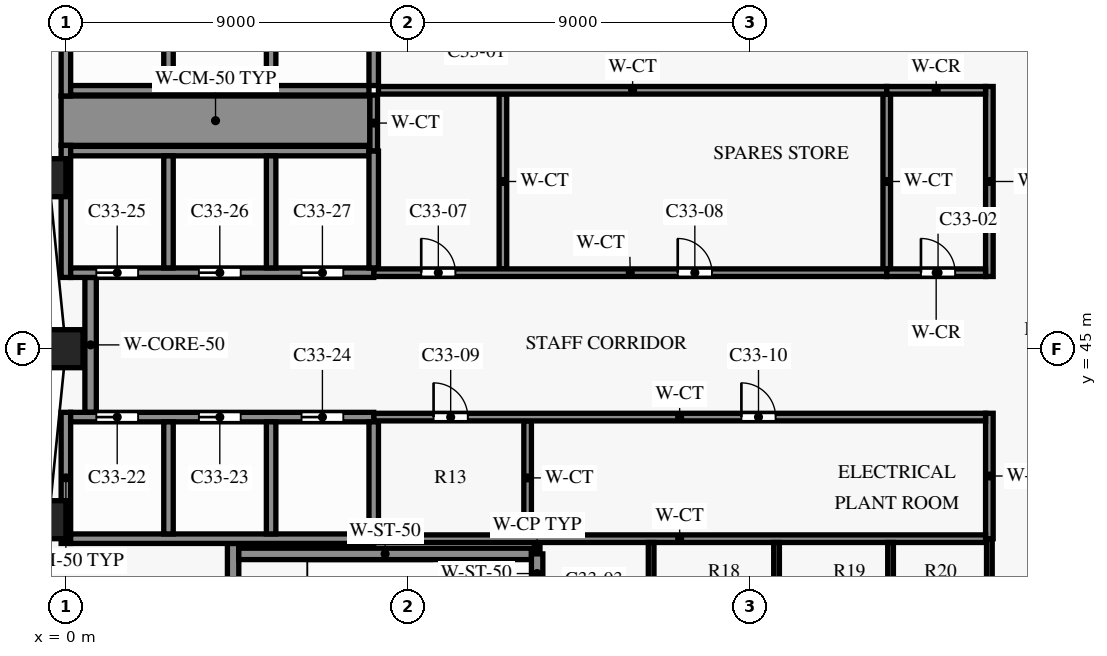
"""IFC4 building model, lengths in metres.
Left out: names, types, materials, properties, quantities, classifications, styles, units other than length and angle.
Written with IfcOpenShell. Run it as: python <this file> out.ifc"""

import sys

from ifc_helpers import new_model, si_unit, direction, frame, frame_2d, origin, origin_2d, place, context, subcontext, project, spatial, rectangle, extrude, element, fill, save


model = new_model("IFC4")
c1 = context("Model", 3, precision=1e-05, world=origin(), true_north=direction((0.0, 1.0)))
c2 = subcontext(c1, "Body", "Model", "MODEL_VIEW")
j1 = project(units=[si_unit("LENGTHUNIT", "METRE"), si_unit("PLANEANGLEUNIT", "RADIAN")], contexts=[c1])
p1 = place(None, origin())
s1 = spatial("IfcSite", under=j1, at=p1, CompositionType="ELEMENT")
p2 = place(p1, origin())
s2 = spatial("IfcBuilding", under=s1, at=p2, CompositionType="ELEMENT")
p3 = place(p2, frame((0.0, 0.0, 248.2)))
s3 = spatial("IfcBuildingStorey", under=s2, at=p3, CompositionType="ELEMENT", Elevation=248.2)
for number, where, z_axis, x_axis in (
    (1, (-0.45, 49.5, 0.0), (0.0, 0.0, 1.0), (0.1, -0.995, 0.0)),
    (2, (0.0, 45.0, 0.0), (0.0, 0.0, 1.0), (0.0, -1.0, 0.0)),
    (3, (-0.45, 40.5, 0.0), (0.0, 0.0, 1.0), (-0.1, -0.995, 0.0)),
):
    element("IfcColumn", number, at=place(p3, frame(where, z_axis=z_axis, x_axis=x_axis)), inside=s3, PredefinedType="COLUMN", context=c2, shape_type="SweptSolid", body=[
        extrude(rectangle(XDim=0.9, YDim=1.0, at=origin_2d()), origin(), (0.0, 0.0, 1.0), 4.2),
    ])
p4 = place(p3, frame((4.55, 39.6, 0.0), z_axis=(0.0, 0.0, 1.0), x_axis=(1.0, 0.0, 0.0)))
e4 = element("IfcWall", 4, at=p4, inside=s3, PredefinedType="SHEAR", context=c2, shape_type="SweptSolid", body=[
    extrude(rectangle(XDim=7.7, YDim=0.3, at=frame_2d((3.85, 0.0))), origin(), (0.0, 0.0, 1.0), 3.9),
])
p5 = place(p3, frame((8.1, 40.0, 0.0), z_axis=(0.0, 0.0, 1.0), x_axis=(1.0, 0.0, 0.0)))
e5 = element("IfcWall", 5, at=p5, inside=s3, PredefinedType="PARTITIONING", context=c2, shape_type="SweptSolid", body=[
    extrude(rectangle(XDim=16.1, YDim=0.2, at=frame_2d((8.05, 0.0))), origin(), (0.0, 0.0, 1.0), 3.9),
])
p6 = place(p3, frame((0.125, 40.0, 0.0), z_axis=(0.0, 0.0, 1.0), x_axis=(1.0, 0.0, 0.0)))
e6 = element("IfcWall", 6, at=p6, inside=s3, PredefinedType="SHEAR", context=c2, shape_type="SweptSolid", body=[
    extrude(rectangle(XDim=7.975, YDim=0.25, at=frame_2d((3.988, 0.0))), origin(), (0.0, 0.0, 1.0), 3.9),
])
p7 = place(p3, frame((8.1, 43.2, 0.0), z_axis=(0.0, 0.0, 1.0), x_axis=(1.0, 0.0, 0.0)))
e7 = element("IfcWall", 7, at=p7, inside=s3, PredefinedType="PARTITIONING", context=c2, shape_type="SweptSolid", body=[
    extrude(rectangle(XDim=16.1, YDim=0.2, at=frame_2d((8.05, 0.0))), origin(), (0.0, 0.0, 1.0), 3.9),
])
p8 = place(p7, frame((1.575, 0.0, 0.0)))
e8 = element("IfcOpeningElement", 8, at=p8, cuts=e7, PredefinedType="OPENING", context=c2, shape_type="SweptSolid", body=[
    extrude(rectangle(XDim=0.9, YDim=2.1, at=frame_2d((0.45, 1.05))), frame((0.0, 0.11, 0.0), z_axis=(0.0, -1.0, 0.0), x_axis=(1.0, 0.0, 0.0)), (0.0, 0.0, 1.0), 0.22),
])
p9 = place(p7, frame((9.675, 0.0, 0.0)))
e9 = element("IfcOpeningElement", 9, at=p9, cuts=e7, PredefinedType="OPENING", context=c2, shape_type="SweptSolid", body=[
    extrude(rectangle(XDim=0.9, YDim=2.1, at=frame_2d((0.45, 1.05))), frame((0.0, 0.11, 0.0), z_axis=(0.0, -1.0, 0.0), x_axis=(1.0, 0.0, 0.0)), (0.0, 0.0, 1.0), 0.22),
])
p10 = place(p3, frame((0.125, 43.2, 0.0), z_axis=(0.0, 0.0, 1.0), x_axis=(1.0, 0.0, 0.0)))
e10 = element("IfcWall", 10, at=p10, inside=s3, PredefinedType="SHEAR", context=c2, shape_type="SweptSolid", body=[
    extrude(rectangle(XDim=7.975, YDim=0.25, at=frame_2d((3.988, 0.0))), origin(), (0.0, 0.0, 1.0), 3.9),
])
p11 = place(p10, frame((0.675, 0.0, 0.0)))
e11 = element("IfcOpeningElement", 11, at=p11, cuts=e10, PredefinedType="OPENING", context=c2, shape_type="SweptSolid", body=[
    extrude(rectangle(XDim=1.1, YDim=2.1, at=frame_2d((0.55, 1.05))), frame((0.0, 0.135, 0.0), z_axis=(0.0, -1.0, 0.0), x_axis=(1.0, 0.0, 0.0)), (0.0, 0.0, 1.0), 0.27),
])
p12 = place(p10, frame((3.375, 0.0, 0.0)))
e12 = element("IfcOpeningElement", 12, at=p12, cuts=e10, PredefinedType="OPENING", context=c2, shape_type="SweptSolid", body=[
    extrude(rectangle(XDim=1.1, YDim=2.1, at=frame_2d((0.55, 1.05))), frame((0.0, 0.135, 0.0), z_axis=(0.0, -1.0, 0.0), x_axis=(1.0, 0.0, 0.0)), (0.0, 0.0, 1.0), 0.27),
])
p13 = place(p10, frame((6.075, 0.0, 0.0)))
e13 = element("IfcOpeningElement", 13, at=p13, cuts=e10, PredefinedType="OPENING", context=c2, shape_type="SweptSolid", body=[
    extrude(rectangle(XDim=1.1, YDim=2.1, at=frame_2d((0.55, 1.05))), frame((0.0, 0.135, 0.0), z_axis=(0.0, -1.0, 0.0), x_axis=(1.0, 0.0, 0.0)), (0.0, 0.0, 1.0), 0.27),
])
p14 = place(p3, frame((8.1, 47.0, 0.0), z_axis=(0.0, 0.0, 1.0), x_axis=(1.0, 0.0, 0.0)))
e14 = element("IfcWall", 14, at=p14, inside=s3, PredefinedType="PARTITIONING", context=c2, shape_type="SweptSolid", body=[
    extrude(rectangle(XDim=13.5, YDim=0.2, at=frame_2d((6.75, 0.0))), origin(), (0.0, 0.0, 1.0), 3.9),
])
p15 = place(p14, frame((1.25, 0.0, 0.0)))
e15 = element("IfcOpeningElement", 15, at=p15, cuts=e14, PredefinedType="OPENING", context=c2, shape_type="SweptSolid", body=[
    extrude(rectangle(XDim=0.9, YDim=2.1, at=frame_2d((0.45, 1.05))), frame((0.0, 0.11, 0.0), z_axis=(0.0, -1.0, 0.0), x_axis=(1.0, 0.0, 0.0)), (0.0, 0.0, 1.0), 0.22),
])
p16 = place(p14, frame((8.0, 0.0, 0.0)))
e16 = element("IfcOpeningElement", 16, at=p16, cuts=e14, PredefinedType="OPENING", context=c2, shape_type="SweptSolid", body=[
    extrude(rectangle(XDim=0.9, YDim=2.1, at=frame_2d((0.45, 1.05))), frame((0.0, 0.11, 0.0), z_axis=(0.0, -1.0, 0.0), x_axis=(1.0, 0.0, 0.0)), (0.0, 0.0, 1.0), 0.22),
])
p17 = place(p3, frame((21.6, 47.0, 0.0), z_axis=(0.0, 0.0, 1.0), x_axis=(1.0, 0.0, 0.0)))
e17 = element("IfcWall", 17, at=p17, inside=s3, PredefinedType="PARTITIONING", context=c2, shape_type="SweptSolid", body=[
    extrude(rectangle(XDim=2.6, YDim=0.2, at=frame_2d((1.3, 0.0))), origin(), (0.0, 0.0, 1.0), 3.9),
])
p18 = place(p17, frame((0.9, 0.0, 0.0)))
e18 = element("IfcOpeningElement", 18, at=p18, cuts=e17, PredefinedType="OPENING", context=c2, shape_type="SweptSolid", body=[
    extrude(rectangle(XDim=0.9, YDim=2.1, at=frame_2d((0.45, 1.05))), frame((0.0, 0.11, 0.0), z_axis=(0.0, -1.0, 0.0), x_axis=(1.0, 0.0, 0.0)), (0.0, 0.0, 1.0), 0.22),
])
p19 = place(p3, frame((0.125, 47.0, 0.0), z_axis=(0.0, 0.0, 1.0), x_axis=(1.0, 0.0, 0.0)))
e19 = element("IfcWall", 19, at=p19, inside=s3, PredefinedType="SHEAR", context=c2, shape_type="SweptSolid", body=[
    extrude(rectangle(XDim=7.975, YDim=0.25, at=frame_2d((3.988, 0.0))), origin(), (0.0, 0.0, 1.0), 3.9),
])
p20 = place(p19, frame((0.675, 0.0, 0.0)))
e20 = element("IfcOpeningElement", 20, at=p20, cuts=e19, PredefinedType="OPENING", context=c2, shape_type="SweptSolid", body=[
    extrude(rectangle(XDim=1.1, YDim=2.1, at=frame_2d((0.55, 1.05))), frame((0.0, 0.135, 0.0), z_axis=(0.0, -1.0, 0.0), x_axis=(1.0, 0.0, 0.0)), (0.0, 0.0, 1.0), 0.27),
])
p21 = place(p19, frame((3.375, 0.0, 0.0)))
e21 = element("IfcOpeningElement", 21, at=p21, cuts=e19, PredefinedType="OPENING", context=c2, shape_type="SweptSolid", body=[
    extrude(rectangle(XDim=1.1, YDim=2.1, at=frame_2d((0.55, 1.05))), frame((0.0, 0.135, 0.0), z_axis=(0.0, -1.0, 0.0), x_axis=(1.0, 0.0, 0.0)), (0.0, 0.0, 1.0), 0.27),
])
p22 = place(p19, frame((6.075, 0.0, 0.0)))
e22 = element("IfcOpeningElement", 22, at=p22, cuts=e19, PredefinedType="OPENING", context=c2, shape_type="SweptSolid", body=[
    extrude(rectangle(XDim=1.1, YDim=2.1, at=frame_2d((0.55, 1.05))), frame((0.0, 0.135, 0.0), z_axis=(0.0, -1.0, 0.0), x_axis=(1.0, 0.0, 0.0)), (0.0, 0.0, 1.0), 0.27),
])
p23 = place(p3, frame((0.125, 50.2, 0.0), z_axis=(0.0, 0.0, 1.0), x_axis=(1.0, 0.0, 0.0)))
e23 = element("IfcWall", 23, at=p23, inside=s3, PredefinedType="SHEAR", context=c2, shape_type="SweptSolid", body=[
    extrude(rectangle(XDim=7.85, YDim=0.25, at=frame_2d((3.925, 0.0))), origin(), (0.0, 0.0, 1.0), 3.9),
])
p24 = place(p3, frame((-0.125, 51.0, 0.0), z_axis=(0.0, 0.0, 1.0), x_axis=(1.0, 0.0, 0.0)))
e24 = element("IfcWall", 24, at=p24, inside=s3, PredefinedType="SHEAR", context=c2, shape_type="SweptSolid", body=[
    extrude(rectangle(XDim=8.125, YDim=1.3, at=frame_2d((4.062, 0.0))), origin(), (0.0, 0.0, 1.0), 3.9),
])
p25 = place(p3, frame((8.225, 51.8, 0.0), z_axis=(0.0, 0.0, 1.0), x_axis=(1.0, 0.0, 0.0)))
e25 = element("IfcWall", 25, at=p25, inside=s3, PredefinedType="PARTITIONING", context=c2, shape_type="SweptSolid", body=[
    extrude(rectangle(XDim=13.375, YDim=0.2, at=frame_2d((6.688, 0.0))), origin(), (0.0, 0.0, 1.0), 3.9),
])
p26 = place(p3, frame((21.6, 51.8, 0.0), z_axis=(0.0, 0.0, 1.0), x_axis=(1.0, 0.0, 0.0)))
e26 = element("IfcWall", 26, at=p26, inside=s3, PredefinedType="PARTITIONING", context=c2, shape_type="SweptSolid", body=[
    extrude(rectangle(XDim=2.6, YDim=0.2, at=frame_2d((1.3, 0.0))), origin(), (0.0, 0.0, 1.0), 3.9),
])
p27 = place(p3, frame((0.125, 51.8, 0.0), z_axis=(0.0, 0.0, 1.0), x_axis=(1.0, 0.0, 0.0)))
e27 = element("IfcWall", 27, at=p27, inside=s3, PredefinedType="SHEAR", context=c2, shape_type="SweptSolid", body=[
    extrude(rectangle(XDim=7.85, YDim=0.25, at=frame_2d((3.925, 0.0))), origin(), (0.0, 0.0, 1.0), 3.9),
])
p28 = place(p3, frame((0.0, 39.875, 0.0), z_axis=(0.0, 0.0, 1.0), x_axis=(0.0, 1.0, 0.0)))
e28 = element("IfcWall", 28, at=p28, inside=s3, PredefinedType="SHEAR", context=c2, shape_type="SweptSolid", body=[
    extrude(rectangle(XDim=3.45, YDim=0.25, at=frame_2d((1.725, 0.0))), origin(), (0.0, 0.0, 1.0), 3.9),
])
p29 = place(p3, frame((0.0, 46.875, 0.0), z_axis=(0.0, 0.0, 1.0), x_axis=(0.0, 1.0, 0.0)))
e29 = element("IfcWall", 29, at=p29, inside=s3, PredefinedType="SHEAR", context=c2, shape_type="SweptSolid", body=[
    extrude(rectangle(XDim=3.475, YDim=0.25, at=frame_2d((1.738, 0.0))), origin(), (0.0, 0.0, 1.0), 3.9),
])
p30 = place(p3, frame((0.0, 51.65, 0.0), z_axis=(0.0, 0.0, 1.0), x_axis=(0.0, 1.0, 0.0)))
e30 = element("IfcWall", 30, at=p30, inside=s3, PredefinedType="SHEAR", context=c2, shape_type="SweptSolid", body=[
    extrude(rectangle(XDim=3.35, YDim=0.25, at=frame_2d((1.675, 0.0))), origin(), (0.0, 0.0, 1.0), 3.9),
])
p31 = place(p3, frame((0.65, 43.325, 0.0), z_axis=(0.0, 0.0, 1.0), x_axis=(0.0, 1.0, 0.0)))
e31 = element("IfcWall", 31, at=p31, inside=s3, PredefinedType="SHEAR", context=c2, shape_type="SweptSolid", body=[
    extrude(rectangle(XDim=3.55, YDim=0.3, at=frame_2d((1.775, 0.0))), origin(), (0.0, 0.0, 1.0), 3.9),
])
for number, where, z_axis, x_axis in (
    (32, (2.7, 40.125, 0.0), (0.0, 0.0, 1.0), (0.0, 1.0, 0.0)),
    (33, (2.7, 47.125, 0.0), (0.0, 0.0, 1.0), (0.0, 1.0, 0.0)),
    (34, (2.7, 51.925, 0.0), (0.0, 0.0, 1.0), (0.0, 1.0, 0.0)),
):
    element("IfcWall", number, at=place(p3, frame(where, z_axis=z_axis, x_axis=x_axis)), inside=s3, PredefinedType="SHEAR", context=c2, shape_type="SweptSolid", body=[
        extrude(rectangle(XDim=2.95, YDim=0.25, at=frame_2d((1.475, 0.0))), origin(), (0.0, 0.0, 1.0), 3.9),
    ])
p32 = place(p3, frame((4.4, 35.85, 0.0), z_axis=(0.0, 0.0, 1.0), x_axis=(0.0, 1.0, 0.0)))
e35 = element("IfcWall", 35, at=p32, inside=s3, PredefinedType="SHEAR", context=c2, shape_type="SweptSolid", body=[
    extrude(rectangle(XDim=4.025, YDim=0.3, at=frame_2d((2.012, 0.0))), origin(), (0.0, 0.0, 1.0), 3.9),
])
for number, where, z_axis, x_axis in (
    (36, (5.4, 40.125, 0.0), (0.0, 0.0, 1.0), (0.0, 1.0, 0.0)),
    (37, (5.4, 47.125, 0.0), (0.0, 0.0, 1.0), (0.0, 1.0, 0.0)),
    (38, (5.4, 51.925, 0.0), (0.0, 0.0, 1.0), (0.0, 1.0, 0.0)),
):
    element("IfcWall", number, at=place(p3, frame(where, z_axis=z_axis, x_axis=x_axis)), inside=s3, PredefinedType="SHEAR", context=c2, shape_type="SweptSolid", body=[
        extrude(rectangle(XDim=2.95, YDim=0.25, at=frame_2d((1.475, 0.0))), origin(), (0.0, 0.0, 1.0), 3.9),
    ])
p33 = place(p3, frame((8.1, 50.2, 0.0), z_axis=(0.0, 0.0, 1.0), x_axis=(0.0, 1.0, 0.0)))
e39 = element("IfcWall", 39, at=p33, inside=s3, PredefinedType="PARTITIONING", context=c2, shape_type="SweptSolid", body=[
    extrude(rectangle(XDim=1.475, YDim=0.2, at=frame_2d((0.738, 0.0))), origin(), (0.0, 0.0, 1.0), 3.9),
])
p34 = place(p3, frame((8.1, 40.125, 0.0), z_axis=(0.0, 0.0, 1.0), x_axis=(0.0, 1.0, 0.0)))
e40 = element("IfcWall", 40, at=p34, inside=s3, PredefinedType="SHEAR", context=c2, shape_type="SweptSolid", body=[
    extrude(rectangle(XDim=2.95, YDim=0.25, at=frame_2d((1.475, 0.0))), origin(), (0.0, 0.0, 1.0), 3.9),
])
p35 = place(p3, frame((8.1, 47.125, 0.0), z_axis=(0.0, 0.0, 1.0), x_axis=(0.0, 1.0, 0.0)))
e41 = element("IfcWall", 41, at=p35, inside=s3, PredefinedType="SHEAR", context=c2, shape_type="SweptSolid", body=[
    extrude(rectangle(XDim=3.075, YDim=0.25, at=frame_2d((1.538, 0.0))), origin(), (0.0, 0.0, 1.0), 3.9),
])
p36 = place(p3, frame((8.1, 51.925, 0.0), z_axis=(0.0, 0.0, 1.0), x_axis=(0.0, 1.0, 0.0)))
e42 = element("IfcWall", 42, at=p36, inside=s3, PredefinedType="SHEAR", context=c2, shape_type="SweptSolid", body=[
    extrude(rectangle(XDim=2.95, YDim=0.25, at=frame_2d((1.475, 0.0))), origin(), (0.0, 0.0, 1.0), 3.9),
])
p37 = place(p3, frame((11.5, 47.1, 0.0), z_axis=(0.0, 0.0, 1.0), x_axis=(0.0, 1.0, 0.0)))
e43 = element("IfcWall", 43, at=p37, inside=s3, PredefinedType="PARTITIONING", context=c2, shape_type="SweptSolid", body=[
    extrude(rectangle(XDim=4.6, YDim=0.2, at=frame_2d((2.3, 0.0))), origin(), (0.0, 0.0, 1.0), 3.9),
])
p38 = place(p3, frame((12.15, 40.1, 0.0), z_axis=(0.0, 0.0, 1.0), x_axis=(0.0, 1.0, 0.0)))
e44 = element("IfcWall", 44, at=p38, inside=s3, PredefinedType="PARTITIONING", context=c2, shape_type="SweptSolid", body=[
    extrude(rectangle(XDim=3.0, YDim=0.2, at=frame_2d((1.5, 0.0))), origin(), (0.0, 0.0, 1.0), 3.9),
])
p39 = place(p3, frame((12.4, 39.6, 0.0), z_axis=(0.0, 0.0, 1.0), x_axis=(0.0, 1.0, 0.0)))
e45 = element("IfcWall", 45, at=p39, inside=s3, PredefinedType="PARTITIONING", context=c2, shape_type="SweptSolid", body=[
    extrude(rectangle(XDim=0.3, YDim=0.15, at=frame_2d((0.15, 0.0))), origin(), (0.0, 0.0, 1.0), 3.9),
])
p40 = place(p3, frame((12.4, 36.15, 0.0), z_axis=(0.0, 0.0, 1.0), x_axis=(0.0, 1.0, 0.0)))
e46 = element("IfcWall", 46, at=p40, inside=s3, PredefinedType="SHEAR", context=c2, shape_type="SweptSolid", body=[
    extrude(rectangle(XDim=3.45, YDim=0.3, at=frame_2d((1.725, 0.0))), origin(), (0.0, 0.0, 1.0), 3.9),
])
for number, where, z_axis, x_axis in (
    (47, (15.4, 36.075, 0.0), (0.0, 0.0, 1.0), (0.0, 1.0, 0.0)),
    (48, (18.7, 36.075, 0.0), (0.0, 0.0, 1.0), (0.0, 1.0, 0.0)),
):
    element("IfcWall", number, at=place(p3, frame(where, z_axis=z_axis, x_axis=x_axis)), inside=s3, PredefinedType="PARTITIONING", context=c2, shape_type="SweptSolid", body=[
        extrude(rectangle(XDim=3.825, YDim=0.15, at=frame_2d((1.913, 0.0))), origin(), (0.0, 0.0, 1.0), 3.9),
    ])
p41 = place(p3, frame((21.6, 47.1, 0.0), z_axis=(0.0, 0.0, 1.0), x_axis=(0.0, 1.0, 0.0)))
e49 = element("IfcWall", 49, at=p41, inside=s3, PredefinedType="PARTITIONING", context=c2, shape_type="SweptSolid", body=[
    extrude(rectangle(XDim=4.6, YDim=0.2, at=frame_2d((2.3, 0.0))), origin(), (0.0, 0.0, 1.0), 3.9),
])
p42 = place(p3, frame((21.7, 36.075, 0.0), z_axis=(0.0, 0.0, 1.0), x_axis=(0.0, 1.0, 0.0)))
e50 = element("IfcWall", 50, at=p42, inside=s3, PredefinedType="PARTITIONING", context=c2, shape_type="SweptSolid", body=[
    extrude(rectangle(XDim=3.825, YDim=0.15, at=frame_2d((1.913, 0.0))), origin(), (0.0, 0.0, 1.0), 3.9),
])
p43 = place(p3, frame((24.3, 35.925, 0.0), z_axis=(0.0, 0.0, 1.0), x_axis=(0.0, 1.0, 0.0)))
e51 = element("IfcWall", 51, at=p43, inside=s3, PredefinedType="SHEAR", context=c2, shape_type="SweptSolid", body=[
    extrude(rectangle(XDim=4.075, YDim=0.15, at=frame_2d((2.038, 0.0))), origin(), (0.0, 0.0, 1.0), 3.9),
])
p44 = place(p3, frame((24.3, 40.0, 0.0), z_axis=(0.0, 0.0, 1.0), x_axis=(0.0, 1.0, 0.0)))
e52 = element("IfcWall", 52, at=p44, inside=s3, PredefinedType="PARTITIONING", context=c2, shape_type="SweptSolid", body=[
    extrude(rectangle(XDim=3.3, YDim=0.2, at=frame_2d((1.65, 0.0))), origin(), (0.0, 0.0, 1.0), 3.9),
])
p45 = place(p3, frame((24.3, 46.9, 0.0), z_axis=(0.0, 0.0, 1.0), x_axis=(0.0, 1.0, 0.0)))
e53 = element("IfcWall", 53, at=p45, inside=s3, PredefinedType="SHEAR", context=c2, shape_type="SweptSolid", body=[
    extrude(rectangle(XDim=5.0, YDim=0.2, at=frame_2d((2.5, 0.0))), origin(), (0.0, 0.0, 1.0), 3.9),
])
p46 = place(p18, origin())
e54 = element("IfcDoor", 54, at=p46, inside=s3, OperationType="SINGLE_SWING_LEFT", PredefinedType="DOOR", context=c2, shape_type="SweptSolid", body=[
    extrude(rectangle(XDim=0.9, YDim=2.1, at=frame_2d((0.45, 1.05))), frame((0.0, 0.025, 0.0), z_axis=(0.0, -1.0, 0.0), x_axis=(1.0, 0.0, 0.0)), (0.0, 0.0, 1.0), 0.05),
])
fill(e18, e54)
p47 = place(p15, origin())
e55 = element("IfcDoor", 55, at=p47, inside=s3, OperationType="SINGLE_SWING_LEFT", PredefinedType="DOOR", context=c2, shape_type="SweptSolid", body=[
    extrude(rectangle(XDim=0.9, YDim=2.1, at=frame_2d((0.45, 1.05))), frame((0.0, 0.025, 0.0), z_axis=(0.0, -1.0, 0.0), x_axis=(1.0, 0.0, 0.0)), (0.0, 0.0, 1.0), 0.05),
])
fill(e15, e55)
p48 = place(p16, origin())
e56 = element("IfcDoor", 56, at=p48, inside=s3, OperationType="SINGLE_SWING_RIGHT", PredefinedType="DOOR", context=c2, shape_type="SweptSolid", body=[
    extrude(rectangle(XDim=0.9, YDim=2.1, at=frame_2d((0.45, 1.05))), frame((0.0, 0.025, 0.0), z_axis=(0.0, -1.0, 0.0), x_axis=(1.0, 0.0, 0.0)), (0.0, 0.0, 1.0), 0.05),
])
fill(e16, e56)
p49 = place(p8, origin())
e57 = element("IfcDoor", 57, at=p49, inside=s3, OperationType="SINGLE_SWING_RIGHT", PredefinedType="DOOR", context=c2, shape_type="SweptSolid", body=[
    extrude(rectangle(XDim=0.9, YDim=2.1, at=frame_2d((0.45, 1.05))), frame((0.0, 0.025, 0.0), z_axis=(0.0, -1.0, 0.0), x_axis=(1.0, 0.0, 0.0)), (0.0, 0.0, 1.0), 0.05),
])
fill(e8, e57)
p50 = place(p9, origin())
e58 = element("IfcDoor", 58, at=p50, inside=s3, OperationType="SINGLE_SWING_LEFT", PredefinedType="DOOR", context=c2, shape_type="SweptSolid", body=[
    extrude(rectangle(XDim=0.9, YDim=2.1, at=frame_2d((0.45, 1.05))), frame((0.0, 0.025, 0.0), z_axis=(0.0, -1.0, 0.0), x_axis=(1.0, 0.0, 0.0)), (0.0, 0.0, 1.0), 0.05),
])
fill(e9, e58)
p51 = place(p11, origin())
e59 = element("IfcDoor", 59, at=p51, inside=s3, OperationType="DOUBLE_DOOR_SLIDING", PredefinedType="DOOR", context=c2, shape_type="SweptSolid", body=[
    extrude(rectangle(XDim=1.1, YDim=2.1, at=frame_2d((0.55, 1.05))), frame((0.0, 0.025, 0.0), z_axis=(0.0, -1.0, 0.0), x_axis=(1.0, 0.0, 0.0)), (0.0, 0.0, 1.0), 0.05),
])
fill(e11, e59)
p52 = place(p12, origin())
e60 = element("IfcDoor", 60, at=p52, inside=s3, OperationType="DOUBLE_DOOR_SLIDING", PredefinedType="DOOR", context=c2, shape_type="SweptSolid", body=[
    extrude(rectangle(XDim=1.1, YDim=2.1, at=frame_2d((0.55, 1.05))), frame((0.0, 0.025, 0.0), z_axis=(0.0, -1.0, 0.0), x_axis=(1.0, 0.0, 0.0)), (0.0, 0.0, 1.0), 0.05),
])
fill(e12, e60)
p53 = place(p13, origin())
e61 = element("IfcDoor", 61, at=p53, inside=s3, OperationType="DOUBLE_DOOR_SLIDING", PredefinedType="DOOR", context=c2, shape_type="SweptSolid", body=[
    extrude(rectangle(XDim=1.1, YDim=2.1, at=frame_2d((0.55, 1.05))), frame((0.0, 0.025, 0.0), z_axis=(0.0, -1.0, 0.0), x_axis=(1.0, 0.0, 0.0)), (0.0, 0.0, 1.0), 0.05),
])
fill(e13, e61)
p54 = place(p20, origin())
e62 = element("IfcDoor", 62, at=p54, inside=s3, OperationType="DOUBLE_DOOR_SLIDING", PredefinedType="DOOR", context=c2, shape_type="SweptSolid", body=[
    extrude(rectangle(XDim=1.1, YDim=2.1, at=frame_2d((0.55, 1.05))), frame((0.0, 0.025, 0.0), z_axis=(0.0, -1.0, 0.0), x_axis=(1.0, 0.0, 0.0)), (0.0, 0.0, 1.0), 0.05),
])
fill(e20, e62)
p55 = place(p21, origin())
e63 = element("IfcDoor", 63, at=p55, inside=s3, OperationType="DOUBLE_DOOR_SLIDING", PredefinedType="DOOR", context=c2, shape_type="SweptSolid", body=[
    extrude(rectangle(XDim=1.1, YDim=2.1, at=frame_2d((0.55, 1.05))), frame((0.0, 0.025, 0.0), z_axis=(0.0, -1.0, 0.0), x_axis=(1.0, 0.0, 0.0)), (0.0, 0.0, 1.0), 0.05),
])
fill(e21, e63)
p56 = place(p22, origin())
e64 = element("IfcDoor", 64, at=p56, inside=s3, OperationType="DOUBLE_DOOR_SLIDING", PredefinedType="DOOR", context=c2, shape_type="SweptSolid", body=[
    extrude(rectangle(XDim=1.1, YDim=2.1, at=frame_2d((0.55, 1.05))), frame((0.0, 0.025, 0.0), z_axis=(0.0, -1.0, 0.0), x_axis=(1.0, 0.0, 0.0)), (0.0, 0.0, 1.0), 0.05),
])
fill(e22, e64)
save(model, sys.argv[1])
